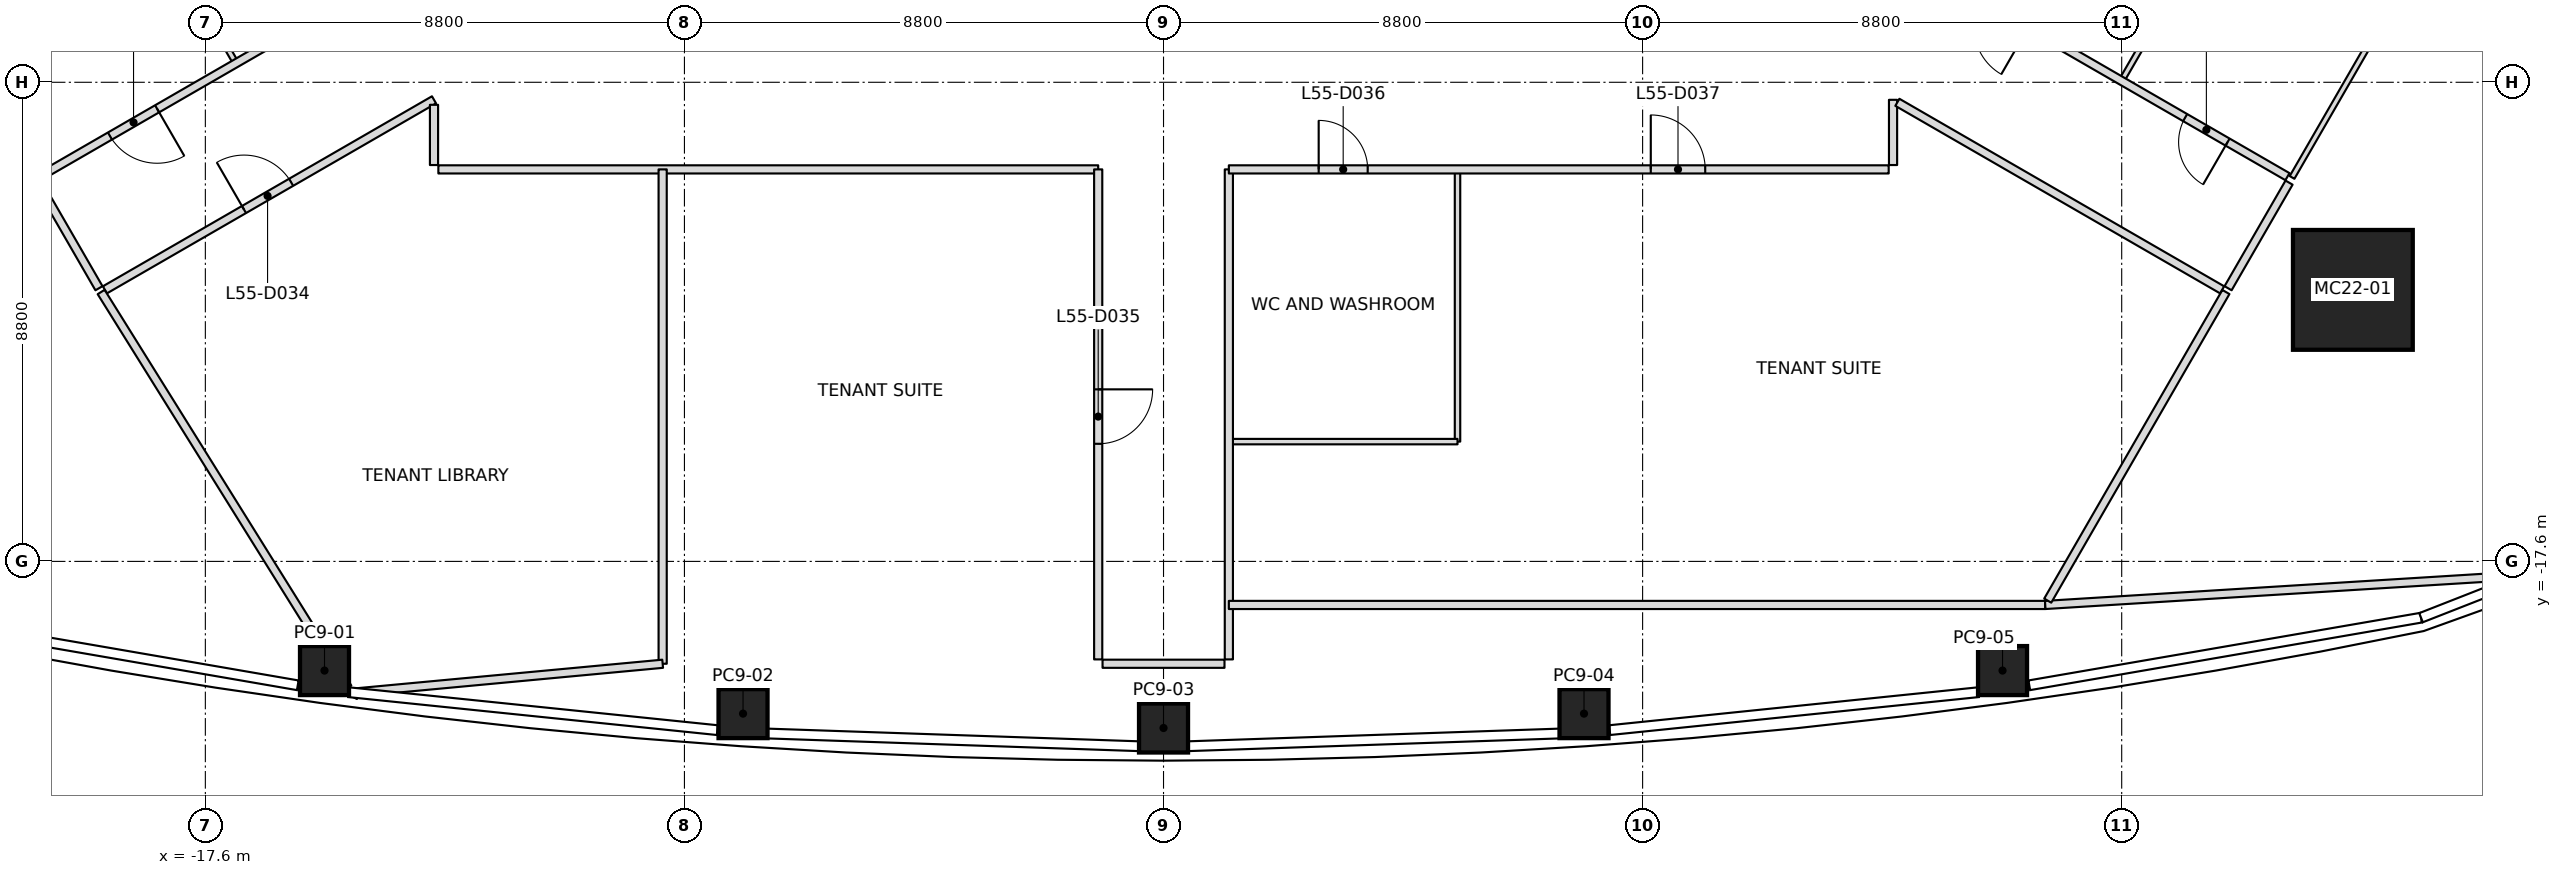
"""IFC4 building model, lengths in metres.
Left out: names, types, materials, properties, quantities, classifications, styles, units other than length and angle.
Written with IfcOpenShell. Run it as: python <this file> out.ifc"""

import sys

from ifc_helpers import new_model, si_unit, direction, frame, frame_2d, origin, origin_2d, place, context, subcontext, project, spatial, rectangle, extrude, element, fill, save


model = new_model("IFC4")
c1 = context("Model", 3, precision=1e-05, world=origin(), true_north=direction((0.0, 1.0)))
c2 = subcontext(c1, "Body", "Model", "MODEL_VIEW")
j1 = project(units=[si_unit("LENGTHUNIT", "METRE"), si_unit("PLANEANGLEUNIT", "RADIAN")], contexts=[c1])
p1 = place(None, origin())
s1 = spatial("IfcSite", under=j1, at=p1, CompositionType="ELEMENT")
p2 = place(p1, origin())
s2 = spatial("IfcBuilding", under=s1, at=p2, CompositionType="ELEMENT")
p3 = place(p2, frame((0.0, 0.0, 247.0)))
s3 = spatial("IfcBuildingStorey", under=s2, at=p3, CompositionType="ELEMENT", Elevation=247.0)
p4 = place(p3, frame((21.846, -12.613, 0.0), z_axis=(-0.027878633223, 0.016043939908, 0.999482553025), x_axis=(0.999611315367, 0.000447457036, 0.02787504211)))
e1 = element("IfcColumn", 1, at=p4, inside=s3, PredefinedType="COLUMN", context=c2, shape_type="SweptSolid", body=[
    extrude(rectangle(XDim=2.2, YDim=2.2, at=origin_2d()), origin(), (0.0, 0.0, 1.0), 4.002),
])
p5 = place(p3, frame((-15.411, -19.605, 0.0), z_axis=(0.017513460473, 0.010373826761, 0.999792809746), x_axis=(-0.990523512969, 0.136415635132, 0.015935643936)))
e2 = element("IfcColumn", 2, at=p5, inside=s3, PredefinedType="COLUMN", context=c2, shape_type="SweptSolid", body=[
    extrude(rectangle(XDim=0.9, YDim=0.9, at=origin_2d()), origin(), (0.0, 0.0, 1.0), 4.001),
])
p6 = place(p3, frame((-7.724, -20.396, 0.0), z_axis=(0.008788174922, 0.01116830563, 0.999899013366), x_axis=(-0.997627554149, 0.06837537008, 0.00800449677)))
e3 = element("IfcColumn", 3, at=p6, inside=s3, PredefinedType="COLUMN", context=c2, shape_type="SweptSolid", body=[
    extrude(rectangle(XDim=0.9, YDim=0.9, at=origin_2d()), origin(), (0.0, 0.0, 1.0), 4.0),
])
p7 = place(p3, frame((0.0, -20.66, 0.0), z_axis=(0.0, 0.01141283087, 0.999934871525), x_axis=(1.0, 0.0, 0.0)))
e4 = element("IfcColumn", 4, at=p7, inside=s3, PredefinedType="COLUMN", context=c2, shape_type="SweptSolid", body=[
    extrude(rectangle(XDim=0.9, YDim=0.9, at=origin_2d()), origin(), (0.0, 0.0, 1.0), 4.0),
])
p8 = place(p3, frame((7.724, -20.396, 0.0), z_axis=(-0.008788174922, 0.01116830563, 0.999899013366), x_axis=(0.997627554149, 0.06837537008, 0.00800449677)))
e5 = element("IfcColumn", 5, at=p8, inside=s3, PredefinedType="COLUMN", context=c2, shape_type="SweptSolid", body=[
    extrude(rectangle(XDim=0.9, YDim=0.9, at=origin_2d()), origin(), (0.0, 0.0, 1.0), 4.0),
])
p9 = place(p3, frame((15.411, -19.605, 0.0), z_axis=(-0.017513460473, 0.010373826761, 0.999792809746), x_axis=(0.990523512969, 0.136415635132, 0.015935643936)))
e6 = element("IfcColumn", 6, at=p9, inside=s3, PredefinedType="COLUMN", context=c2, shape_type="SweptSolid", body=[
    extrude(rectangle(XDim=0.9, YDim=0.9, at=origin_2d()), origin(), (0.0, 0.0, 1.0), 4.001),
])
p10 = place(p3, frame((-19.514, -12.652, 0.0), z_axis=(0.0, 0.0, 1.0), x_axis=(0.529109501503, -0.848553554833, 0.0)))
e7 = element("IfcWall", 7, at=p10, inside=s3, PredefinedType="PARTITIONING", context=c2, shape_type="SweptSolid", body=[
    extrude(rectangle(XDim=8.564, YDim=0.15, at=frame_2d((4.282, 0.0))), origin(), (0.0, 0.0, 1.0), 3.45),
])
p11 = place(p3, frame((-9.2, -10.4, 0.0), z_axis=(0.0, 0.0, 1.0), x_axis=(0.0, -1.0, 0.0)))
e8 = element("IfcWall", 8, at=p11, inside=s3, PredefinedType="PARTITIONING", context=c2, shape_type="SweptSolid", body=[
    extrude(rectangle(XDim=9.08, YDim=0.15, at=frame_2d((4.54, 0.0))), origin(), (0.0, 0.0, 1.0), 3.45),
])
p12 = place(p3, frame((-9.2, -19.48, 0.0), z_axis=(0.0, 0.0, 1.0), x_axis=(-0.995665878054, -0.093002469213, 0.0)))
e9 = element("IfcWall", 9, at=p12, inside=s3, PredefinedType="PARTITIONING", context=c2, shape_type="SweptSolid", body=[
    extrude(rectangle(XDim=5.657, YDim=0.15, at=frame_2d((2.829, 0.0))), origin(), (0.0, 0.0, 1.0), 3.234),
])
p13 = place(p3, frame((-14.883, -20.093, 0.0), z_axis=(0.0, 0.0, 1.0), x_axis=(0.467358739114, 0.884067762659, 0.0)))
e10 = element("IfcWall", 10, at=p13, inside=s3, PredefinedType="PARTITIONING", context=c2, shape_type="SweptSolid", body=[
    extrude(rectangle(XDim=0.106, YDim=0.15, at=frame_2d((0.053, 0.0))), origin(), (0.0, 0.0, 1.0), 3.45),
])
p14 = place(p3, frame((1.2, -18.4, 0.0), z_axis=(0.0, 0.0, 1.0), x_axis=(1.0, 0.0, 0.0)))
e11 = element("IfcWall", 11, at=p14, inside=s3, PredefinedType="PARTITIONING", context=c2, shape_type="SweptSolid", body=[
    extrude(rectangle(XDim=14.996, YDim=0.15, at=frame_2d((7.498, 0.0))), origin(), (0.0, 0.0, 1.0), 3.317),
])
p15 = place(p3, frame((16.196, -18.4, 0.0), z_axis=(0.0, 0.0, 1.0), x_axis=(0.998093542485, 0.061719368516, 0.0)))
e12 = element("IfcWall", 12, at=p15, inside=s3, PredefinedType="PARTITIONING", context=c2, shape_type="SweptSolid", body=[
    extrude(rectangle(XDim=8.766, YDim=0.15, at=frame_2d((4.383, 0.0))), origin(), (0.0, 0.0, 1.0), 3.234),
])
p16 = place(p3, frame((19.514, -12.652, 0.0), z_axis=(0.0, 0.0, 1.0), x_axis=(-0.500014101285, -0.866017262251, 0.0)))
e13 = element("IfcWall", 13, at=p16, inside=s3, PredefinedType="PARTITIONING", context=c2, shape_type="SweptSolid", body=[
    extrude(rectangle(XDim=6.546, YDim=0.15, at=frame_2d((3.273, 0.0))), origin(), (0.0, 0.0, 1.0), 3.234),
])
p17 = place(p3, frame((-20.674, -10.643, 0.0), z_axis=(0.0, 0.0, 1.0), x_axis=(0.49994888933, -0.866054910533, 0.0)))
e14 = element("IfcWall", 14, at=p17, inside=s3, PredefinedType="PARTITIONING", context=c2, shape_type="SweptSolid", body=[
    extrude(rectangle(XDim=2.24, YDim=0.15, at=frame_2d((1.12, 0.0))), origin(), (0.0, 0.0, 1.0), 3.233),
])
p18 = place(p3, frame((-13.4, -6.351, 0.0), z_axis=(0.0, 0.0, 1.0), x_axis=(-0.866023751359, -0.500002862074, 0.0)))
e15 = element("IfcWall", 15, at=p18, inside=s3, PredefinedType="PARTITIONING", context=c2, shape_type="SweptSolid", body=[
    extrude(rectangle(XDim=8.366, YDim=0.15, at=frame_2d((4.183, 0.0))), origin(), (0.0, 0.0, 1.0), 3.317),
])
p19 = place(p18, frame((1.65, 0.0, 0.0)))
e16 = element("IfcOpeningElement", 16, at=p19, cuts=e15, PredefinedType="OPENING", context=c2, shape_type="SweptSolid", body=[
    extrude(rectangle(XDim=0.9, YDim=2.1, at=frame_2d((0.45, 1.05))), frame((0.0, 0.075, 0.0), z_axis=(0.0, -1.0, 0.0), x_axis=(1.0, 0.0, 0.0)), (0.0, 0.0, 1.0), 0.15),
])
p20 = place(p18, frame((5.873, 0.0, 0.0)))
e17 = element("IfcOpeningElement", 17, at=p20, cuts=e15, PredefinedType="OPENING", context=c2, shape_type="SweptSolid", body=[
    extrude(rectangle(XDim=1.0, YDim=2.1, at=frame_2d((0.5, 1.05))), frame((0.0, 0.075, 0.0), z_axis=(0.0, -1.0, 0.0), x_axis=(1.0, 0.0, 0.0)), (0.0, 0.0, 1.0), 0.15),
])
p21 = place(p3, frame((-19.445, -12.612, 0.0), z_axis=(0.0, 0.0, 1.0), x_axis=(0.866028321769, 0.499994945868, 0.0)))
e18 = element("IfcWall", 18, at=p21, inside=s3, PredefinedType="PARTITIONING", context=c2, shape_type="SweptSolid", body=[
    extrude(rectangle(XDim=6.98, YDim=0.15, at=frame_2d((3.49, 0.0))), origin(), (0.0, 0.0, 1.0), 3.233),
])
p22 = place(p21, frame((2.95, 0.0, 0.0)))
e19 = element("IfcOpeningElement", 19, at=p22, cuts=e18, PredefinedType="OPENING", context=c2, shape_type="SweptSolid", body=[
    extrude(rectangle(XDim=1.0, YDim=2.1, at=frame_2d((0.5, 1.05))), frame((0.0, 0.075, 0.0), z_axis=(0.0, -1.0, 0.0), x_axis=(1.0, 0.0, 0.0)), (0.0, 0.0, 1.0), 0.15),
])
p23 = place(p3, frame((-13.4, -9.214, 0.0), z_axis=(0.0, 0.0, 1.0), x_axis=(0.0, -1.0, 0.0)))
e20 = element("IfcWall", 20, at=p23, inside=s3, PredefinedType="PARTITIONING", context=c2, shape_type="SweptSolid", body=[
    extrude(rectangle(XDim=1.106, YDim=0.15, at=frame_2d((0.553, 0.0))), origin(), (0.0, 0.0, 1.0), 3.233),
])
p24 = place(p3, frame((-13.32, -10.4, 0.0), z_axis=(0.0, 0.0, 1.0), x_axis=(1.0, 0.0, 0.0)))
e21 = element("IfcWall", 21, at=p24, inside=s3, PredefinedType="PARTITIONING", context=c2, shape_type="SweptSolid", body=[
    extrude(rectangle(XDim=12.12, YDim=0.15, at=frame_2d((6.06, 0.0))), origin(), (0.0, 0.0, 1.0), 3.317),
])
p25 = place(p3, frame((-1.2, -10.4, 0.0), z_axis=(0.0, 0.0, 1.0), x_axis=(0.0, -1.0, 0.0)))
e22 = element("IfcWall", 22, at=p25, inside=s3, PredefinedType="PARTITIONING", context=c2, shape_type="SweptSolid", body=[
    extrude(rectangle(XDim=9.0, YDim=0.15, at=frame_2d((4.5, 0.0))), origin(), (0.0, 0.0, 1.0), 3.45),
])
p26 = place(p25, frame((4.04, 0.0, 0.0)))
e23 = element("IfcOpeningElement", 23, at=p26, cuts=e22, PredefinedType="OPENING", context=c2, shape_type="SweptSolid", body=[
    extrude(rectangle(XDim=1.0, YDim=2.1, at=frame_2d((0.5, 1.05))), frame((0.0, 0.075, 0.0), z_axis=(0.0, -1.0, 0.0), x_axis=(1.0, 0.0, 0.0)), (0.0, 0.0, 1.0), 0.15),
])
p27 = place(p3, frame((-1.12, -19.48, 0.0), z_axis=(0.0, 0.0, 1.0), x_axis=(1.0, 0.0, 0.0)))
e24 = element("IfcWall", 24, at=p27, inside=s3, PredefinedType="PARTITIONING", context=c2, shape_type="SweptSolid", body=[
    extrude(rectangle(XDim=2.24, YDim=0.15, at=frame_2d((1.12, 0.0))), origin(), (0.0, 0.0, 1.0), 3.45),
])
p28 = place(p3, frame((1.2, -19.4, 0.0), z_axis=(0.0, 0.0, 1.0), x_axis=(0.0, 1.0, 0.0)))
e25 = element("IfcWall", 25, at=p28, inside=s3, PredefinedType="PARTITIONING", context=c2, shape_type="SweptSolid", body=[
    extrude(rectangle(XDim=9.0, YDim=0.15, at=frame_2d((4.5, 0.0))), origin(), (0.0, 0.0, 1.0), 3.45),
])
p29 = place(p3, frame((1.2, -10.4, 0.0), z_axis=(0.0, 0.0, 1.0), x_axis=(1.0, 0.0, 0.0)))
e26 = element("IfcWall", 26, at=p29, inside=s3, PredefinedType="PARTITIONING", context=c2, shape_type="SweptSolid", body=[
    extrude(rectangle(XDim=12.12, YDim=0.15, at=frame_2d((6.06, 0.0))), origin(), (0.0, 0.0, 1.0), 3.317),
])
p30 = place(p29, frame((1.65, 0.0, 0.0)))
e27 = element("IfcOpeningElement", 27, at=p30, cuts=e26, PredefinedType="OPENING", context=c2, shape_type="SweptSolid", body=[
    extrude(rectangle(XDim=0.9, YDim=2.1, at=frame_2d((0.45, 1.05))), frame((0.0, 0.075, 0.0), z_axis=(0.0, -1.0, 0.0), x_axis=(1.0, 0.0, 0.0)), (0.0, 0.0, 1.0), 0.15),
])
p31 = place(p29, frame((7.75, 0.0, 0.0)))
e28 = element("IfcOpeningElement", 28, at=p31, cuts=e26, PredefinedType="OPENING", context=c2, shape_type="SweptSolid", body=[
    extrude(rectangle(XDim=1.0, YDim=2.1, at=frame_2d((0.5, 1.05))), frame((0.0, 0.075, 0.0), z_axis=(0.0, -1.0, 0.0), x_axis=(1.0, 0.0, 0.0)), (0.0, 0.0, 1.0), 0.15),
])
p32 = place(p3, frame((13.4, -10.32, 0.0), z_axis=(0.0, 0.0, 1.0), x_axis=(0.0, 1.0, 0.0)))
e29 = element("IfcWall", 29, at=p32, inside=s3, PredefinedType="PARTITIONING", context=c2, shape_type="SweptSolid", body=[
    extrude(rectangle(XDim=1.198, YDim=0.15, at=frame_2d((0.599, 0.0))), origin(), (0.0, 0.0, 1.0), 3.233),
])
p33 = place(p3, frame((13.479, -9.168, 0.0), z_axis=(0.0, 0.0, 1.0), x_axis=(0.866033903246, -0.499985278211, 0.0)))
e30 = element("IfcWall", 30, at=p33, inside=s3, PredefinedType="PARTITIONING", context=c2, shape_type="SweptSolid", body=[
    extrude(rectangle(XDim=6.888, YDim=0.15, at=frame_2d((3.444, 0.0))), origin(), (0.0, 0.0, 1.0), 3.233),
])
p34 = place(p3, frame((20.645, -10.534, 0.0), z_axis=(0.0, 0.0, 1.0), x_axis=(-0.866023751359, 0.500002862074, 0.0)))
e31 = element("IfcWall", 31, at=p34, inside=s3, PredefinedType="PARTITIONING", context=c2, shape_type="SweptSolid", body=[
    extrude(rectangle(XDim=8.366, YDim=0.15, at=frame_2d((4.183, 0.0))), origin(), (0.0, 0.0, 1.0), 3.317),
])
p35 = place(p34, frame((1.27, 0.0, 0.0)))
e32 = element("IfcOpeningElement", 32, at=p35, cuts=e31, PredefinedType="OPENING", context=c2, shape_type="SweptSolid", body=[
    extrude(rectangle(XDim=0.9, YDim=2.1, at=frame_2d((0.45, 1.05))), frame((0.0, 0.075, 0.0), z_axis=(0.0, -1.0, 0.0), x_axis=(1.0, 0.0, 0.0)), (0.0, 0.0, 1.0), 0.15),
])
p36 = place(p34, frame((5.493, 0.0, 0.0)))
e33 = element("IfcOpeningElement", 33, at=p36, cuts=e31, PredefinedType="OPENING", context=c2, shape_type="SweptSolid", body=[
    extrude(rectangle(XDim=1.0, YDim=2.1, at=frame_2d((0.5, 1.05))), frame((0.0, 0.075, 0.0), z_axis=(0.0, -1.0, 0.0), x_axis=(1.0, 0.0, 0.0)), (0.0, 0.0, 1.0), 0.15),
])
p37 = place(p3, frame((19.554, -12.583, 0.0), z_axis=(0.0, 0.0, 1.0), x_axis=(0.49994888933, 0.866054910533, 0.0)))
e34 = element("IfcWall", 34, at=p37, inside=s3, PredefinedType="PARTITIONING", context=c2, shape_type="SweptSolid", body=[
    extrude(rectangle(XDim=2.24, YDim=0.15, at=frame_2d((1.12, 0.0))), origin(), (0.0, 0.0, 1.0), 3.233),
])
p38 = place(p3, frame((-17.052, -8.425, 0.0), z_axis=(0.0, 0.0, 1.0), x_axis=(-0.500011595943, 0.86601870876, 0.0)))
e35 = element("IfcWall", 35, at=p38, inside=s3, PredefinedType="PARTITIONING", context=c2, shape_type="SweptSolid", body=[
    extrude(rectangle(XDim=4.97, YDim=0.1, at=frame_2d((2.485, 0.0))), origin(), (0.0, 0.0, 1.0), 3.317),
])
p39 = place(p3, frame((5.4, -10.43, 0.0), z_axis=(0.0, 0.0, 1.0), x_axis=(0.0, -1.0, 0.0)))
e36 = element("IfcWall", 36, at=p39, inside=s3, PredefinedType="PARTITIONING", context=c2, shape_type="SweptSolid", body=[
    extrude(rectangle(XDim=4.97, YDim=0.1, at=frame_2d((2.485, 0.0))), origin(), (0.0, 0.0, 1.0), 3.45),
])
p40 = place(p3, frame((5.4, -15.4, 0.0), z_axis=(0.0, 0.0, 1.0), x_axis=(-1.0, 0.0, 0.0)))
e37 = element("IfcWall", 37, at=p40, inside=s3, PredefinedType="PARTITIONING", context=c2, shape_type="SweptSolid", body=[
    extrude(rectangle(XDim=4.17, YDim=0.1, at=frame_2d((2.085, 0.0))), origin(), (0.0, 0.0, 1.0), 3.317),
])
for number, where, z_axis, x_axis in (
    (38, (17.611, -8.748, 0.0), (0.0, 0.0, 1.0), (0.5, 0.866, 0.0)),
    (39, (22.814, -6.936, 0.0), (0.0, 0.0, 1.0), (-0.5, -0.866, 0.0)),
):
    element("IfcWall", number, at=place(p3, frame(where, z_axis=z_axis, x_axis=x_axis)), inside=s3, PredefinedType="PARTITIONING", context=c2, shape_type="SweptSolid", body=[
        extrude(rectangle(XDim=4.17, YDim=0.1, at=frame_2d((2.085, 0.0))), origin(), (0.0, 0.0, 1.0), 3.45),
    ])
p41 = place(p20, origin())
e40 = element("IfcDoor", 40, at=p41, inside=s3, OperationType="SINGLE_SWING_LEFT", PredefinedType="DOOR", context=c2, shape_type="SweptSolid", body=[
    extrude(rectangle(XDim=1.0, YDim=2.1, at=frame_2d((0.5, 1.05))), frame((0.0, 0.025, 0.0), z_axis=(0.0, -1.0, 0.0), x_axis=(1.0, 0.0, 0.0)), (0.0, 0.0, 1.0), 0.05),
])
fill(e17, e40)
p42 = place(p22, origin())
e41 = element("IfcDoor", 41, at=p42, inside=s3, OperationType="SINGLE_SWING_LEFT", PredefinedType="DOOR", context=c2, shape_type="SweptSolid", body=[
    extrude(rectangle(XDim=1.0, YDim=2.1, at=frame_2d((0.5, 1.05))), frame((0.0, 0.025, 0.0), z_axis=(0.0, -1.0, 0.0), x_axis=(1.0, 0.0, 0.0)), (0.0, 0.0, 1.0), 0.05),
])
fill(e19, e41)
p43 = place(p26, origin())
e42 = element("IfcDoor", 42, at=p43, inside=s3, OperationType="SINGLE_SWING_RIGHT", PredefinedType="DOOR", context=c2, shape_type="SweptSolid", body=[
    extrude(rectangle(XDim=1.0, YDim=2.1, at=frame_2d((0.5, 1.05))), frame((0.0, 0.025, 0.0), z_axis=(0.0, -1.0, 0.0), x_axis=(1.0, 0.0, 0.0)), (0.0, 0.0, 1.0), 0.05),
])
fill(e23, e42)
p44 = place(p30, origin())
e43 = element("IfcDoor", 43, at=p44, inside=s3, OperationType="SINGLE_SWING_LEFT", PredefinedType="DOOR", context=c2, shape_type="SweptSolid", body=[
    extrude(rectangle(XDim=0.9, YDim=2.1, at=frame_2d((0.45, 1.05))), frame((0.0, 0.025, 0.0), z_axis=(0.0, -1.0, 0.0), x_axis=(1.0, 0.0, 0.0)), (0.0, 0.0, 1.0), 0.05),
])
fill(e27, e43)
p45 = place(p31, origin())
e44 = element("IfcDoor", 44, at=p45, inside=s3, OperationType="SINGLE_SWING_LEFT", PredefinedType="DOOR", context=c2, shape_type="SweptSolid", body=[
    extrude(rectangle(XDim=1.0, YDim=2.1, at=frame_2d((0.5, 1.05))), frame((0.0, 0.025, 0.0), z_axis=(0.0, -1.0, 0.0), x_axis=(1.0, 0.0, 0.0)), (0.0, 0.0, 1.0), 0.05),
])
fill(e28, e44)
p46 = place(p35, origin())
e45 = element("IfcDoor", 45, at=p46, inside=s3, OperationType="SINGLE_SWING_RIGHT", PredefinedType="DOOR", context=c2, shape_type="SweptSolid", body=[
    extrude(rectangle(XDim=0.9, YDim=2.1, at=frame_2d((0.45, 1.05))), frame((0.0, 0.025, 0.0), z_axis=(0.0, -1.0, 0.0), x_axis=(1.0, 0.0, 0.0)), (0.0, 0.0, 1.0), 0.05),
])
fill(e32, e45)
save(model, sys.argv[1])
